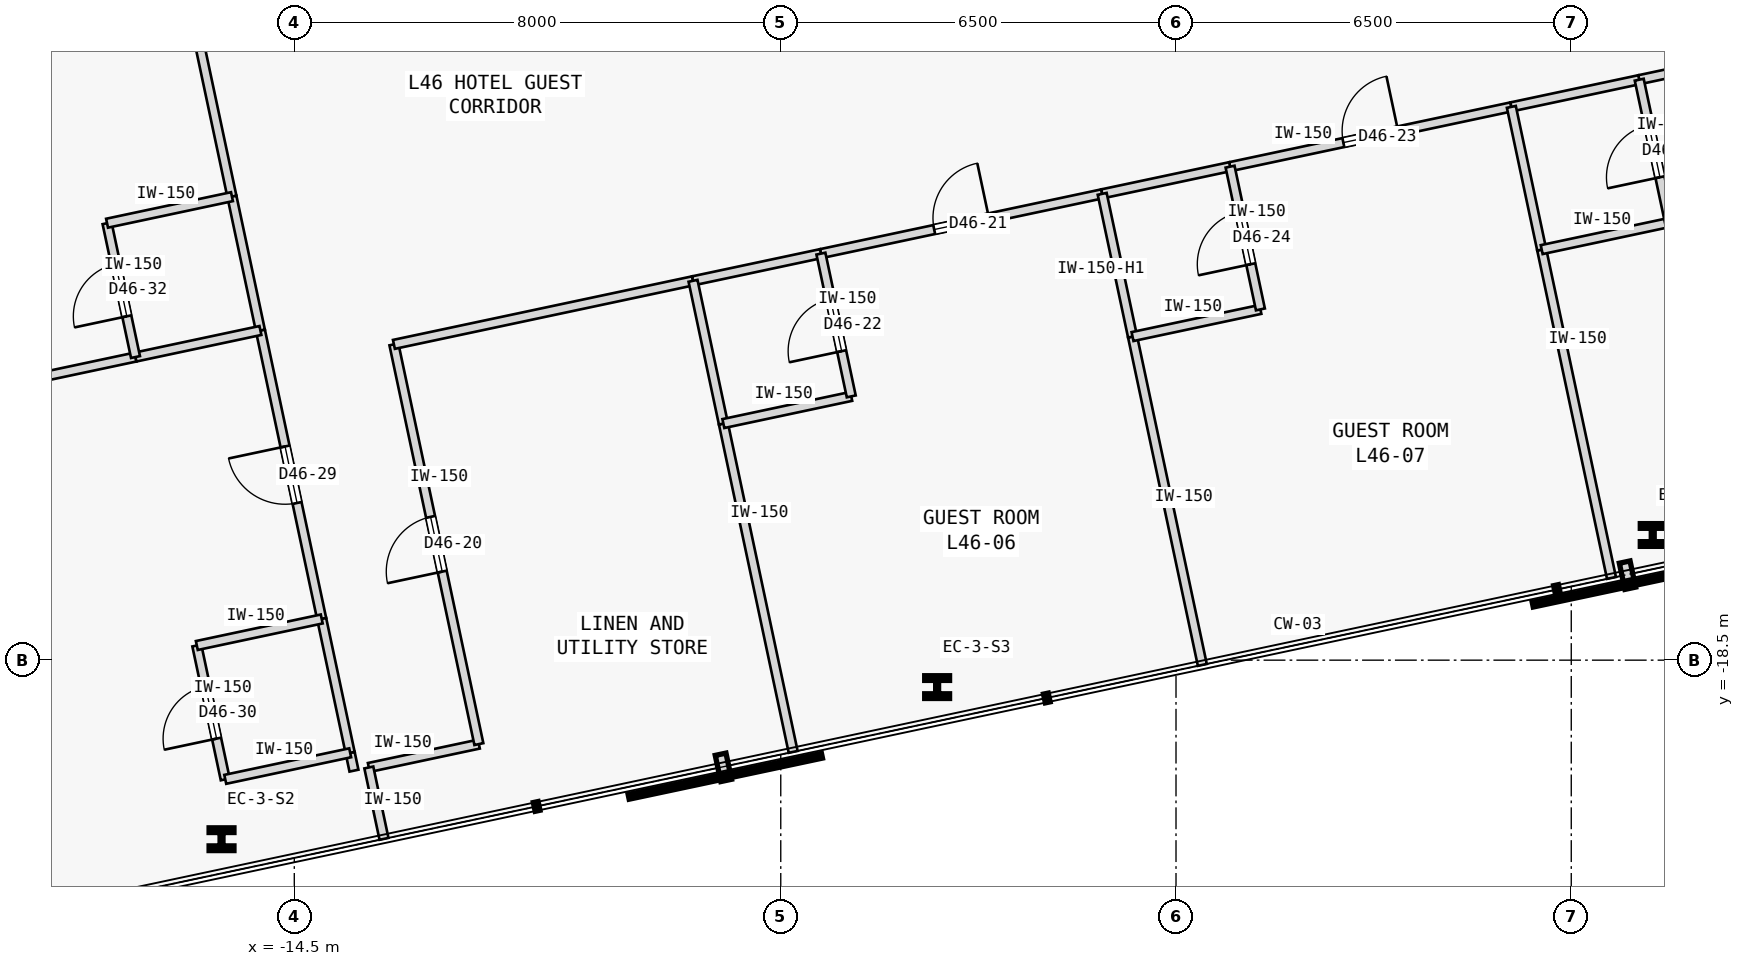
"""IFC4 building model, lengths in metres.
Left out: names, types, materials, properties, quantities, classifications, styles, units other than length and angle.
Written with IfcOpenShell. Run it as: python <this file> out.ifc"""

import sys

from ifc_helpers import new_model, si_unit, direction, frame, frame_2d, origin, origin_2d, place, context, subcontext, project, spatial, rectangle, i_section, extrude, element, fill, save


model = new_model("IFC4")
c1 = context("Model", 3, precision=1e-05, world=origin(), true_north=direction((0.0, 1.0)))
c2 = subcontext(c1, "Body", "Model", "MODEL_VIEW")
j1 = project(units=[si_unit("LENGTHUNIT", "METRE"), si_unit("PLANEANGLEUNIT", "RADIAN")], contexts=[c1])
p1 = place(None, origin())
s1 = spatial("IfcSite", under=j1, at=p1, CompositionType="ELEMENT")
p2 = place(p1, origin())
s2 = spatial("IfcBuilding", under=s1, at=p2, CompositionType="ELEMENT")
p3 = place(p2, frame((0.0, 0.0, 178.6)))
s3 = spatial("IfcBuildingStorey", under=s2, at=p3, CompositionType="ELEMENT", Elevation=178.6)
for number, where, z_axis, x_axis in (
    (1, (-15.697, -21.444, 0.0), (0.0, 0.0, 1.0), (1.0, 0.0, 0.0)),
    (2, (-3.928, -18.943, 0.0), (0.0, 0.0, 1.0), (1.0, 0.0, 0.0)),
    (3, (7.84, -16.441, 0.0), (0.0, 0.0, 1.0), (1.0, 0.0, 0.0)),
):
    element("IfcColumn", number, at=place(p3, frame(where, z_axis=z_axis, x_axis=x_axis)), inside=s3, PredefinedType="COLUMN", context=c2, shape_type="SweptSolid", body=[
        extrude(i_section(OverallWidth=0.409, OverallDepth=0.374, WebThickness=0.048, FlangeThickness=0.077, FilletRadius=0.015, at=origin_2d()), origin(), (0.0, 0.0, 1.0), 3.4),
    ])
p4 = place(p3, frame((-13.274, -20.265, 0.0), z_axis=(0.0, 0.0, 1.0), x_axis=(0.978160192495, 0.207852442415, 0.0)))
e4 = element("IfcWall", 4, at=p4, inside=s3, PredefinedType="PARTITIONING", context=c2, shape_type="SweptSolid", body=[
    extrude(rectangle(XDim=1.85, YDim=0.15, at=frame_2d((0.925, 0.0))), origin(), (0.0, 0.0, 1.0), 3.175),
])
p5 = place(p3, frame((-11.465, -19.88, 0.0), z_axis=(0.0, 0.0, 1.0), x_axis=(-0.207916109912, 0.978146661416, 0.0)))
e5 = element("IfcWall", 5, at=p5, inside=s3, PredefinedType="PARTITIONING", context=c2, shape_type="SweptSolid", body=[
    extrude(rectangle(XDim=6.72, YDim=0.15, at=frame_2d((3.36, 0.0))), origin(), (0.0, 0.0, 1.0), 3.175),
])
p6 = place(p5, frame((2.9, 0.0, 0.0)))
e6 = element("IfcOpeningElement", 6, at=p6, cuts=e5, PredefinedType="OPENING", context=c2, shape_type="SweptSolid", body=[
    extrude(rectangle(XDim=0.92, YDim=2.15, at=frame_2d((0.46, 1.075))), frame((0.0, 0.085, 0.0), z_axis=(0.0, -1.0, 0.0), x_axis=(1.0, 0.0, 0.0)), (0.0, 0.0, 1.0), 0.17),
])
p7 = place(p3, frame((-12.862, -13.307, 0.0), z_axis=(0.0, 0.0, 1.0), x_axis=(0.978145647498, 0.207920879857, 0.0)))
e7 = element("IfcWall", 7, at=p7, inside=s3, PredefinedType="PARTITIONING", context=c2, shape_type="SweptSolid", body=[
    extrude(rectangle(XDim=5.029, YDim=0.15, at=frame_2d((2.515, 0.0))), origin(), (0.0, 0.0, 1.0), 3.175),
])
p8 = place(p3, frame((-5.84, -11.814, 0.0), z_axis=(0.0, 0.0, 1.0), x_axis=(0.978148615161, 0.207906918255, 0.0)))
e8 = element("IfcWall", 8, at=p8, inside=s3, PredefinedType="PARTITIONING", context=c2, shape_type="SweptSolid", body=[
    extrude(rectangle(XDim=4.729, YDim=0.15, at=frame_2d((2.364, 0.0))), origin(), (0.0, 0.0, 1.0), 3.175),
])
p9 = place(p8, frame((1.905, 0.0, 0.0)))
e9 = element("IfcOpeningElement", 9, at=p9, cuts=e8, PredefinedType="OPENING", context=c2, shape_type="SweptSolid", body=[
    extrude(rectangle(XDim=0.92, YDim=2.15, at=frame_2d((0.46, 1.075))), frame((0.0, 0.085, 0.0), z_axis=(0.0, -1.0, 0.0), x_axis=(1.0, 0.0, 0.0)), (0.0, 0.0, 1.0), 0.17),
])
p10 = place(p3, frame((-7.943, -12.261, 0.0), z_axis=(0.0, 0.0, 1.0), x_axis=(0.978146728319, 0.207915795165, 0.0)))
e10 = element("IfcWall", 10, at=p10, inside=s3, PredefinedType="PARTITIONING", context=c2, shape_type="SweptSolid", body=[
    extrude(rectangle(XDim=2.15, YDim=0.15, at=frame_2d((1.075, 0.0))), origin(), (0.0, 0.0, 1.0), 3.175),
])
p11 = place(p3, frame((0.889, -10.384, 0.0), z_axis=(0.0, 0.0, 1.0), x_axis=(0.978150846638, 0.207896419455, 0.0)))
e11 = element("IfcWall", 11, at=p11, inside=s3, PredefinedType="PARTITIONING", context=c2, shape_type="SweptSolid", body=[
    extrude(rectangle(XDim=4.729, YDim=0.15, at=frame_2d((2.365, 0.0))), origin(), (0.0, 0.0, 1.0), 3.175),
])
p12 = place(p11, frame((1.905, 0.0, 0.0)))
e12 = element("IfcOpeningElement", 12, at=p12, cuts=e11, PredefinedType="OPENING", context=c2, shape_type="SweptSolid", body=[
    extrude(rectangle(XDim=0.92, YDim=2.15, at=frame_2d((0.46, 1.075))), frame((0.0, 0.085, 0.0), z_axis=(0.0, -1.0, 0.0), x_axis=(1.0, 0.0, 0.0)), (0.0, 0.0, 1.0), 0.17),
])
p13 = place(p3, frame((-1.214, -10.831, 0.0), z_axis=(0.0, 0.0, 1.0), x_axis=(0.978146728319, 0.207915795165, 0.0)))
e13 = element("IfcWall", 13, at=p13, inside=s3, PredefinedType="PARTITIONING", context=c2, shape_type="SweptSolid", body=[
    extrude(rectangle(XDim=2.15, YDim=0.15, at=frame_2d((1.075, 0.0))), origin(), (0.0, 0.0, 1.0), 3.175),
])
p14 = place(p3, frame((7.618, -8.954, 0.0), z_axis=(0.0, 0.0, 1.0), x_axis=(0.978140347221, 0.207945812984, 0.0)))
e14 = element("IfcWall", 14, at=p14, inside=s3, PredefinedType="PARTITIONING", context=c2, shape_type="SweptSolid", body=[
    extrude(rectangle(XDim=4.729, YDim=0.15, at=frame_2d((2.365, 0.0))), origin(), (0.0, 0.0, 1.0), 3.175),
])
p15 = place(p14, frame((1.195, 0.0, 0.0)))
e15 = element("IfcOpeningElement", 15, at=p15, cuts=e14, PredefinedType="OPENING", context=c2, shape_type="SweptSolid", body=[
    extrude(rectangle(XDim=0.92, YDim=2.15, at=frame_2d((0.46, 1.075))), frame((0.0, 0.085, 0.0), z_axis=(0.0, -1.0, 0.0), x_axis=(1.0, 0.0, 0.0)), (0.0, 0.0, 1.0), 0.17),
])
p16 = place(p3, frame((5.515, -9.401, 0.0), z_axis=(0.0, 0.0, 1.0), x_axis=(0.978146728319, 0.207915795165, 0.0)))
e16 = element("IfcWall", 16, at=p16, inside=s3, PredefinedType="PARTITIONING", context=c2, shape_type="SweptSolid", body=[
    extrude(rectangle(XDim=2.15, YDim=0.15, at=frame_2d((1.075, 0.0))), origin(), (0.0, 0.0, 1.0), 3.175),
])
p17 = place(p3, frame((-13.519, -20.317, 0.0), z_axis=(0.0, 0.0, 1.0), x_axis=(-0.207527808066, 0.978229118806, 0.0)))
e17 = element("IfcWall", 17, at=p17, inside=s3, PredefinedType="PARTITIONING", context=c2, shape_type="SweptSolid", body=[
    extrude(rectangle(XDim=0.3, YDim=0.15, at=frame_2d((0.15, 0.0))), origin(), (0.0, 0.0, 1.0), 3.175),
])
p18 = place(p3, frame((-14.049, -17.823, 0.0), z_axis=(0.0, 0.0, 1.0), x_axis=(-0.2079027059, 0.978149510494, 0.0)))
e18 = element("IfcWall", 18, at=p18, inside=s3, PredefinedType="PARTITIONING", context=c2, shape_type="SweptSolid", body=[
    extrude(rectangle(XDim=4.85, YDim=0.15, at=frame_2d((2.425, 0.0))), origin(), (0.0, 0.0, 1.0), 3.175),
])
p19 = place(p18, frame((1.95, 0.0, 0.0)))
e19 = element("IfcOpeningElement", 19, at=p19, cuts=e18, PredefinedType="OPENING", context=c2, shape_type="SweptSolid", body=[
    extrude(rectangle(XDim=0.95, YDim=2.15, at=frame_2d((0.475, 1.075))), frame((0.0, 0.085, 0.0), z_axis=(0.0, -1.0, 0.0), x_axis=(1.0, 0.0, 0.0)), (0.0, 0.0, 1.0), 0.17),
])
p20 = place(p3, frame((-13.581, -20.023, 0.0), z_axis=(0.0, 0.0, 1.0), x_axis=(-0.207891197838, 0.978151956427, 0.0)))
e20 = element("IfcWall", 20, at=p20, inside=s3, PredefinedType="PARTITIONING", context=c2, shape_type="SweptSolid", body=[
    extrude(rectangle(XDim=2.25, YDim=0.15, at=frame_2d((1.125, 0.0))), origin(), (0.0, 0.0, 1.0), 3.175),
])
p21 = place(p3, frame((-15.525, -10.878, 0.0), z_axis=(0.0, 0.0, 1.0), x_axis=(-0.207887725283, 0.978152694459, 0.0)))
e21 = element("IfcWall", 21, at=p21, inside=s3, PredefinedType="PARTITIONING", context=c2, shape_type="SweptSolid", body=[
    extrude(rectangle(XDim=6.35, YDim=0.15, at=frame_2d((3.175, 0.0))), origin(), (0.0, 0.0, 1.0), 3.175),
])
p22 = place(p21, frame((2.7, 0.0, 0.0)))
e22 = element("IfcOpeningElement", 22, at=p22, cuts=e21, PredefinedType="OPENING", context=c2, shape_type="SweptSolid", body=[
    extrude(rectangle(XDim=0.95, YDim=2.15, at=frame_2d((0.475, 1.075))), frame((0.0, 0.085, 0.0), z_axis=(0.0, -1.0, 0.0), x_axis=(1.0, 0.0, 0.0)), (0.0, 0.0, 1.0), 0.17),
])
p23 = place(p3, frame((-15.057, -13.079, 0.0), z_axis=(0.0, 0.0, 1.0), x_axis=(-0.207995007687, 0.978129887478, 0.0)))
e23 = element("IfcWall", 23, at=p23, inside=s3, PredefinedType="PARTITIONING", context=c2, shape_type="SweptSolid", body=[
    extrude(rectangle(XDim=2.25, YDim=0.15, at=frame_2d((1.125, 0.0))), origin(), (0.0, 0.0, 1.0), 3.175),
])
p24 = place(p3, frame((-6.296, -20.008, 0.0), z_axis=(0.0, 0.0, 1.0), x_axis=(-0.20792487872, 0.978144797466, 0.0)))
e24 = element("IfcWall", 24, at=p24, inside=s3, PredefinedType="PARTITIONING", context=c2, shape_type="SweptSolid", body=[
    extrude(rectangle(XDim=5.52, YDim=0.15, at=frame_2d((2.76, 0.0))), origin(), (0.0, 0.0, 1.0), 3.175),
])
p25 = place(p3, frame((-7.444, -14.609, 0.0), z_axis=(0.0, 0.0, 1.0), x_axis=(-0.207917150959, 0.978146440129, 0.0)))
e25 = element("IfcWall", 25, at=p25, inside=s3, PredefinedType="PARTITIONING", context=c2, shape_type="SweptSolid", body=[
    extrude(rectangle(XDim=2.4, YDim=0.15, at=frame_2d((1.2, 0.0))), origin(), (0.0, 0.0, 1.0), 3.175),
])
p26 = place(p3, frame((-13.025, -21.439, 0.0), z_axis=(0.0, 0.0, 1.0), x_axis=(-0.207917150959, 0.978146440129, 0.0)))
e26 = element("IfcWall", 26, at=p26, inside=s3, PredefinedType="PARTITIONING", context=c2, shape_type="SweptSolid", body=[
    extrude(rectangle(XDim=1.2, YDim=0.15, at=frame_2d((0.6, 0.0))), origin(), (0.0, 0.0, 1.0), 3.175),
])
p27 = place(p3, frame((-7.444, -14.609, 0.0), z_axis=(0.0, 0.0, 1.0), x_axis=(0.978141818715, 0.207938891219, 0.0)))
e27 = element("IfcWall", 27, at=p27, inside=s3, PredefinedType="PARTITIONING", context=c2, shape_type="SweptSolid", body=[
    extrude(rectangle(XDim=2.15, YDim=0.15, at=frame_2d((1.075, 0.0))), origin(), (0.0, 0.0, 1.0), 3.175),
])
p28 = place(p3, frame((-5.341, -14.162, 0.0), z_axis=(0.0, 0.0, 1.0), x_axis=(-0.207819824493, 0.978167123015, 0.0)))
e28 = element("IfcWall", 28, at=p28, inside=s3, PredefinedType="PARTITIONING", context=c2, shape_type="SweptSolid", body=[
    extrude(rectangle(XDim=2.4, YDim=0.15, at=frame_2d((1.2, 0.0))), origin(), (0.0, 0.0, 1.0), 3.175),
])
p29 = place(p28, frame((0.76, 0.0, 0.0)))
e29 = element("IfcOpeningElement", 29, at=p29, cuts=e28, PredefinedType="OPENING", context=c2, shape_type="SweptSolid", body=[
    extrude(rectangle(XDim=0.88, YDim=2.15, at=frame_2d((0.44, 1.075))), frame((0.0, 0.085, 0.0), z_axis=(0.0, -1.0, 0.0), x_axis=(1.0, 0.0, 0.0)), (0.0, 0.0, 1.0), 0.17),
])
p30 = place(p3, frame((0.433, -18.578, 0.0), z_axis=(0.0, 0.0, 1.0), x_axis=(-0.20791588359, 0.978146709523, 0.0)))
e30 = element("IfcWall", 30, at=p30, inside=s3, PredefinedType="PARTITIONING", context=c2, shape_type="SweptSolid", body=[
    extrude(rectangle(XDim=5.52, YDim=0.15, at=frame_2d((2.76, 0.0))), origin(), (0.0, 0.0, 1.0), 3.175),
])
p31 = place(p3, frame((-0.715, -13.179, 0.0), z_axis=(0.0, 0.0, 1.0), x_axis=(-0.207937840262, 0.978142042133, 0.0)))
e31 = element("IfcWall", 31, at=p31, inside=s3, PredefinedType="PARTITIONING", context=c2, shape_type="SweptSolid", body=[
    extrude(rectangle(XDim=2.4, YDim=0.15, at=frame_2d((1.2, 0.0))), origin(), (0.0, 0.0, 1.0), 2.725),
])
p32 = place(p3, frame((-0.715, -13.179, 0.0), z_axis=(0.0, 0.0, 1.0), x_axis=(0.978146728319, 0.207915795165, 0.0)))
e32 = element("IfcWall", 32, at=p32, inside=s3, PredefinedType="PARTITIONING", context=c2, shape_type="SweptSolid", body=[
    extrude(rectangle(XDim=2.15, YDim=0.15, at=frame_2d((1.075, 0.0))), origin(), (0.0, 0.0, 1.0), 3.175),
])
p33 = place(p3, frame((1.388, -12.732, 0.0), z_axis=(0.0, 0.0, 1.0), x_axis=(-0.207937840262, 0.978142042133, 0.0)))
e33 = element("IfcWall", 33, at=p33, inside=s3, PredefinedType="PARTITIONING", context=c2, shape_type="SweptSolid", body=[
    extrude(rectangle(XDim=2.4, YDim=0.15, at=frame_2d((1.2, 0.0))), origin(), (0.0, 0.0, 1.0), 3.175),
])
p34 = place(p33, frame((0.76, 0.0, 0.0)))
e34 = element("IfcOpeningElement", 34, at=p34, cuts=e33, PredefinedType="OPENING", context=c2, shape_type="SweptSolid", body=[
    extrude(rectangle(XDim=0.88, YDim=2.15, at=frame_2d((0.44, 1.075))), frame((0.0, 0.085, 0.0), z_axis=(0.0, -1.0, 0.0), x_axis=(1.0, 0.0, 0.0)), (0.0, 0.0, 1.0), 0.17),
])
p35 = place(p3, frame((7.161, -17.148, 0.0), z_axis=(0.0, 0.0, 1.0), x_axis=(-0.20791588359, 0.978146709523, 0.0)))
e35 = element("IfcWall", 35, at=p35, inside=s3, PredefinedType="PARTITIONING", context=c2, shape_type="SweptSolid", body=[
    extrude(rectangle(XDim=5.52, YDim=0.15, at=frame_2d((2.76, 0.0))), origin(), (0.0, 0.0, 1.0), 3.175),
])
p36 = place(p3, frame((6.014, -11.749, 0.0), z_axis=(0.0, 0.0, 1.0), x_axis=(-0.207937840262, 0.978142042133, 0.0)))
e36 = element("IfcWall", 36, at=p36, inside=s3, PredefinedType="PARTITIONING", context=c2, shape_type="SweptSolid", body=[
    extrude(rectangle(XDim=2.4, YDim=0.15, at=frame_2d((1.2, 0.0))), origin(), (0.0, 0.0, 1.0), 3.175),
])
p37 = place(p3, frame((6.014, -11.749, 0.0), z_axis=(0.0, 0.0, 1.0), x_axis=(0.978146728319, 0.207915795165, 0.0)))
e37 = element("IfcWall", 37, at=p37, inside=s3, PredefinedType="PARTITIONING", context=c2, shape_type="SweptSolid", body=[
    extrude(rectangle(XDim=2.15, YDim=0.15, at=frame_2d((1.075, 0.0))), origin(), (0.0, 0.0, 1.0), 3.175),
])
p38 = place(p3, frame((8.117, -11.302, 0.0), z_axis=(0.0, 0.0, 1.0), x_axis=(-0.207937840262, 0.978142042133, 0.0)))
e38 = element("IfcWall", 38, at=p38, inside=s3, PredefinedType="PARTITIONING", context=c2, shape_type="SweptSolid", body=[
    extrude(rectangle(XDim=2.4, YDim=0.15, at=frame_2d((1.2, 0.0))), origin(), (0.0, 0.0, 1.0), 3.175),
])
p39 = place(p38, frame((0.76, 0.0, 0.0)))
e39 = element("IfcOpeningElement", 39, at=p39, cuts=e38, PredefinedType="OPENING", context=c2, shape_type="SweptSolid", body=[
    extrude(rectangle(XDim=0.88, YDim=2.15, at=frame_2d((0.44, 1.075))), frame((0.0, 0.085, 0.0), z_axis=(0.0, -1.0, 0.0), x_axis=(1.0, 0.0, 0.0)), (0.0, 0.0, 1.0), 0.17),
])
p40 = place(p3, frame((-15.635, -20.46, 0.0), z_axis=(0.0, 0.0, 1.0), x_axis=(-0.207913264065, 0.978147266328, 0.0)))
e40 = element("IfcWall", 40, at=p40, inside=s3, PredefinedType="PARTITIONING", context=c2, shape_type="SweptSolid", body=[
    extrude(rectangle(XDim=2.25, YDim=0.15, at=frame_2d((1.125, 0.0))), origin(), (0.0, 0.0, 1.0), 3.175),
])
p41 = place(p40, frame((0.685, 0.0, 0.0)))
e41 = element("IfcOpeningElement", 41, at=p41, cuts=e40, PredefinedType="OPENING", context=c2, shape_type="SweptSolid", body=[
    extrude(rectangle(XDim=0.88, YDim=2.15, at=frame_2d((0.44, 1.075))), frame((0.0, 0.085, 0.0), z_axis=(0.0, -1.0, 0.0), x_axis=(1.0, 0.0, 0.0)), (0.0, 0.0, 1.0), 0.17),
])
for number, where, z_axis, x_axis in (
    (42, (-15.635, -20.46, 0.0), (0.0, 0.0, 1.0), (0.978, 0.208, 0.0)),
    (43, (-16.103, -18.259, 0.0), (0.0, 0.0, 1.0), (0.978, 0.208, 0.0)),
):
    element("IfcWall", number, at=place(p3, frame(where, z_axis=z_axis, x_axis=x_axis)), inside=s3, PredefinedType="PARTITIONING", context=c2, shape_type="SweptSolid", body=[
        extrude(rectangle(XDim=2.1, YDim=0.15, at=frame_2d((1.05, 0.0))), origin(), (0.0, 0.0, 1.0), 3.175),
    ])
p42 = place(p3, frame((-32.486, -16.783, 0.0), z_axis=(0.0, 0.0, 1.0), x_axis=(0.978146137903, 0.207918572776, 0.0)))
e44 = element("IfcWall", 44, at=p42, inside=s3, PredefinedType="PARTITIONING", context=c2, shape_type="SweptSolid", body=[
    extrude(rectangle(XDim=15.718, YDim=0.15, at=frame_2d((7.859, 0.0))), origin(), (0.0, 0.0, 1.0), 3.175),
])
p43 = place(p3, frame((-17.111, -13.515, 0.0), z_axis=(0.0, 0.0, 1.0), x_axis=(0.97815826, 0.207861536591, 0.0)))
e45 = element("IfcWall", 45, at=p43, inside=s3, PredefinedType="PARTITIONING", context=c2, shape_type="SweptSolid", body=[
    extrude(rectangle(XDim=2.1, YDim=0.15, at=frame_2d((1.05, 0.0))), origin(), (0.0, 0.0, 1.0), 3.175),
])
p44 = place(p3, frame((-17.111, -13.515, 0.0), z_axis=(0.0, 0.0, 1.0), x_axis=(-0.207913264065, 0.978147266328, 0.0)))
e46 = element("IfcWall", 46, at=p44, inside=s3, PredefinedType="PARTITIONING", context=c2, shape_type="SweptSolid", body=[
    extrude(rectangle(XDim=2.25, YDim=0.15, at=frame_2d((1.125, 0.0))), origin(), (0.0, 0.0, 1.0), 3.175),
])
p45 = place(p44, frame((0.685, 0.0, 0.0)))
e47 = element("IfcOpeningElement", 47, at=p45, cuts=e46, PredefinedType="OPENING", context=c2, shape_type="SweptSolid", body=[
    extrude(rectangle(XDim=0.88, YDim=2.15, at=frame_2d((0.44, 1.075))), frame((0.0, 0.085, 0.0), z_axis=(0.0, -1.0, 0.0), x_axis=(1.0, 0.0, 0.0)), (0.0, 0.0, 1.0), 0.17),
])
p46 = place(p3, frame((-17.579, -11.314, 0.0), z_axis=(0.0, 0.0, 1.0), x_axis=(0.978129588365, 0.207996414309, 0.0)))
e48 = element("IfcWall", 48, at=p46, inside=s3, PredefinedType="PARTITIONING", context=c2, shape_type="SweptSolid", body=[
    extrude(rectangle(XDim=2.1, YDim=0.15, at=frame_2d((1.05, 0.0))), origin(), (0.0, 0.0, 1.0), 3.175),
])
p47 = place(p6, origin())
e49 = element("IfcDoor", 49, at=p47, inside=s3, OperationType="SINGLE_SWING_LEFT", PredefinedType="DOOR", context=c2, shape_type="SweptSolid", body=[
    extrude(rectangle(XDim=0.92, YDim=2.15, at=frame_2d((0.46, 1.075))), frame((0.0, 0.025, 0.0), z_axis=(0.0, -1.0, 0.0), x_axis=(1.0, 0.0, 0.0)), (0.0, 0.0, 1.0), 0.05),
])
fill(e6, e49)
p48 = place(p9, origin())
e50 = element("IfcDoor", 50, at=p48, inside=s3, OperationType="SINGLE_SWING_RIGHT", PredefinedType="DOOR", context=c2, shape_type="SweptSolid", body=[
    extrude(rectangle(XDim=0.92, YDim=2.15, at=frame_2d((0.46, 1.075))), frame((0.0, 0.025, 0.0), z_axis=(0.0, -1.0, 0.0), x_axis=(1.0, 0.0, 0.0)), (0.0, 0.0, 1.0), 0.05),
])
fill(e9, e50)
p49 = place(p29, origin())
e51 = element("IfcDoor", 51, at=p49, inside=s3, OperationType="SINGLE_SWING_LEFT", PredefinedType="DOOR", context=c2, shape_type="SweptSolid", body=[
    extrude(rectangle(XDim=0.88, YDim=2.15, at=frame_2d((0.44, 1.075))), frame((0.0, 0.025, 0.0), z_axis=(0.0, -1.0, 0.0), x_axis=(1.0, 0.0, 0.0)), (0.0, 0.0, 1.0), 0.05),
])
fill(e29, e51)
p50 = place(p12, origin())
e52 = element("IfcDoor", 52, at=p50, inside=s3, OperationType="SINGLE_SWING_RIGHT", PredefinedType="DOOR", context=c2, shape_type="SweptSolid", body=[
    extrude(rectangle(XDim=0.92, YDim=2.15, at=frame_2d((0.46, 1.075))), frame((0.0, 0.025, 0.0), z_axis=(0.0, -1.0, 0.0), x_axis=(1.0, 0.0, 0.0)), (0.0, 0.0, 1.0), 0.05),
])
fill(e12, e52)
p51 = place(p34, origin())
e53 = element("IfcDoor", 53, at=p51, inside=s3, OperationType="SINGLE_SWING_LEFT", PredefinedType="DOOR", context=c2, shape_type="SweptSolid", body=[
    extrude(rectangle(XDim=0.88, YDim=2.15, at=frame_2d((0.44, 1.075))), frame((0.0, 0.025, 0.0), z_axis=(0.0, -1.0, 0.0), x_axis=(1.0, 0.0, 0.0)), (0.0, 0.0, 1.0), 0.05),
])
fill(e34, e53)
p52 = place(p39, origin())
e54 = element("IfcDoor", 54, at=p52, inside=s3, OperationType="SINGLE_SWING_LEFT", PredefinedType="DOOR", context=c2, shape_type="SweptSolid", body=[
    extrude(rectangle(XDim=0.88, YDim=2.15, at=frame_2d((0.44, 1.075))), frame((0.0, 0.025, 0.0), z_axis=(0.0, -1.0, 0.0), x_axis=(1.0, 0.0, 0.0)), (0.0, 0.0, 1.0), 0.05),
])
fill(e39, e54)
p53 = place(p19, origin())
e55 = element("IfcDoor", 55, at=p53, inside=s3, OperationType="SINGLE_SWING_RIGHT", PredefinedType="DOOR", context=c2, shape_type="SweptSolid", body=[
    extrude(rectangle(XDim=0.95, YDim=2.15, at=frame_2d((0.475, 1.075))), frame((0.0, 0.025, 0.0), z_axis=(0.0, -1.0, 0.0), x_axis=(1.0, 0.0, 0.0)), (0.0, 0.0, 1.0), 0.05),
])
fill(e19, e55)
p54 = place(p41, origin())
e56 = element("IfcDoor", 56, at=p54, inside=s3, OperationType="SINGLE_SWING_LEFT", PredefinedType="DOOR", context=c2, shape_type="SweptSolid", body=[
    extrude(rectangle(XDim=0.88, YDim=2.15, at=frame_2d((0.44, 1.075))), frame((0.0, 0.025, 0.0), z_axis=(0.0, -1.0, 0.0), x_axis=(1.0, 0.0, 0.0)), (0.0, 0.0, 1.0), 0.05),
])
fill(e41, e56)
p55 = place(p45, origin())
e57 = element("IfcDoor", 57, at=p55, inside=s3, OperationType="SINGLE_SWING_LEFT", PredefinedType="DOOR", context=c2, shape_type="SweptSolid", body=[
    extrude(rectangle(XDim=0.88, YDim=2.15, at=frame_2d((0.44, 1.075))), frame((0.0, 0.025, 0.0), z_axis=(0.0, -1.0, 0.0), x_axis=(1.0, 0.0, 0.0)), (0.0, 0.0, 1.0), 0.05),
])
fill(e47, e57)
save(model, sys.argv[1])
